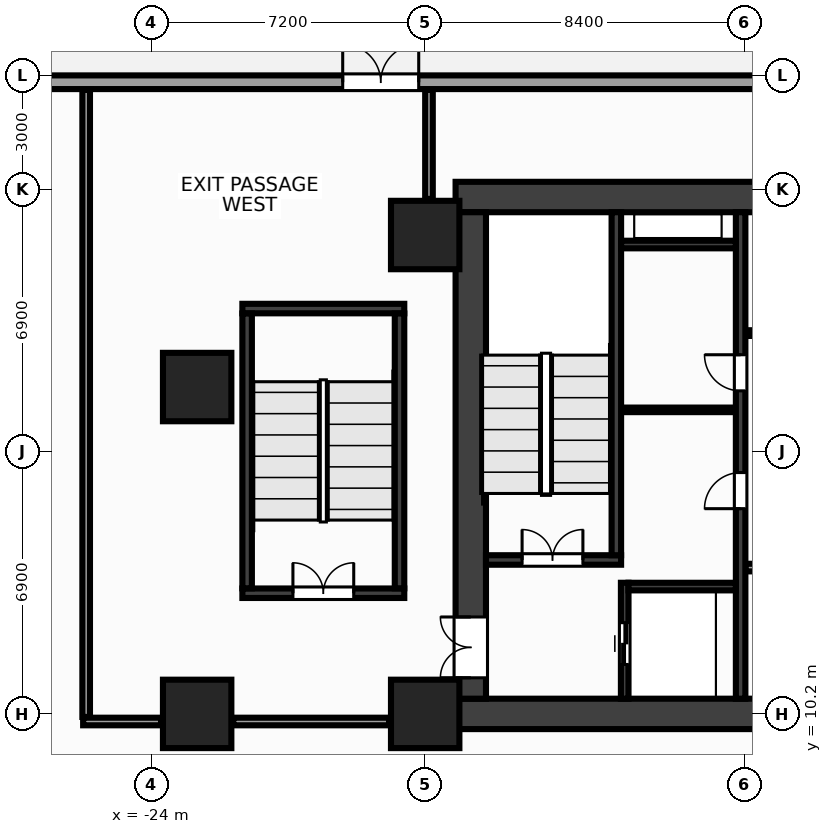
"""IFC4 building model, lengths in metres.
Left out: names, types, materials, properties, quantities, classifications, styles, units other than length and angle.
Written with IfcOpenShell. Run it as: python <this file> out.ifc"""

import sys

from ifc_helpers import new_model, si_unit, direction, frame, frame_2d, origin, origin_2d, place, context, subcontext, project, spatial, rectangle, extrude, source, transform, mapped, element, fill, save


model = new_model("IFC4")
c1 = context("Model", 3, precision=1e-05, world=origin(), true_north=direction((0.0, 1.0)))
c2 = subcontext(c1, "Body", "Model", "MODEL_VIEW")
j1 = project(units=[si_unit("LENGTHUNIT", "METRE"), si_unit("PLANEANGLEUNIT", "RADIAN")], contexts=[c1])
p1 = place(None, origin())
s1 = spatial("IfcSite", under=j1, at=p1, CompositionType="ELEMENT")
p2 = place(p1, origin())
s2 = spatial("IfcBuilding", under=s1, at=p2, CompositionType="ELEMENT")
p3 = place(p2, origin())
s3 = spatial("IfcBuildingStorey", under=s2, at=p3, CompositionType="ELEMENT", Elevation=0.0)
m1 = source(origin(), c2, "Body", "SweptSolid", [
    extrude(rectangle(XDim=32.0, YDim=0.8, at=frame_2d((16.0, 0.0))), origin(), (0.0, 0.0, 1.0), 5.0),
])
p4 = place(p3, frame((-16.0, 23.8, 0.0), z_axis=(0.0, 0.0, 1.0), x_axis=(1.0, 0.0, 0.0)))
e1 = element("IfcWall", 1, at=p4, inside=s3, PredefinedType="SHEAR", context=c2, shape_type="MappedRepresentation", body=[
    mapped(m1, transform((0.0, 0.0, 0.0), x_axis=(1.0, 0.0, 0.0), y_axis=(0.0, 1.0, 0.0), z_axis=(0.0, 0.0, 1.0), scale=1.0)),
])
p5 = place(p3, frame((-16.0, 10.2, 0.0), z_axis=(0.0, 0.0, 1.0), x_axis=(1.0, 0.0, 0.0)))
e2 = element("IfcWall", 2, at=p5, inside=s3, PredefinedType="SHEAR", context=c2, shape_type="MappedRepresentation", body=[
    mapped(m1, transform((0.0, 0.0, 0.0), x_axis=(1.0, 0.0, 0.0), y_axis=(0.0, 1.0, 0.0), z_axis=(0.0, 0.0, 1.0), scale=1.0)),
])
p6 = place(p5, frame((28.55, 0.0, 0.0)))
e3 = element("IfcOpeningElement", 3, at=p6, cuts=e2, PredefinedType="OPENING", context=c2, shape_type="SweptSolid", body=[
    extrude(rectangle(XDim=1.6, YDim=2.15, at=frame_2d((0.8, 1.075))), frame((0.0, 0.412, 0.0), z_axis=(0.0, -1.0, 0.0), x_axis=(1.0, 0.0, 0.0)), (0.0, 0.0, 1.0), 0.824),
])
p7 = place(p5, frame((15.25, 0.0, 0.0)))
e4 = element("IfcOpeningElement", 4, at=p7, cuts=e2, PredefinedType="OPENING", context=c2, shape_type="SweptSolid", body=[
    extrude(rectangle(XDim=1.5, YDim=2.2, at=frame_2d((0.75, 1.1))), frame((0.0, 0.412, 0.0), z_axis=(0.0, -1.0, 0.0), x_axis=(1.0, 0.0, 0.0)), (0.0, 0.0, 1.0), 0.824),
])
m2 = source(origin(), c2, "Body", "SweptSolid", [
    extrude(rectangle(XDim=12.8, YDim=0.8, at=frame_2d((6.4, 0.0))), origin(), (0.0, 0.0, 1.0), 5.0),
])
p8 = place(p3, frame((-15.6, 10.6, 0.0), z_axis=(0.0, 0.0, 1.0), x_axis=(0.0, 1.0, 0.0)))
e5 = element("IfcWall", 5, at=p8, inside=s3, PredefinedType="SHEAR", context=c2, shape_type="MappedRepresentation", body=[
    mapped(m2, transform((0.0, 0.0, 0.0), x_axis=(1.0, 0.0, 0.0), y_axis=(0.0, 1.0, 0.0), z_axis=(0.0, 0.0, 1.0), scale=1.0)),
])
p9 = place(p8, frame((0.55, 0.0, 0.0)))
e6 = element("IfcOpeningElement", 6, at=p9, cuts=e5, PredefinedType="OPENING", context=c2, shape_type="SweptSolid", body=[
    extrude(rectangle(XDim=1.6, YDim=2.15, at=frame_2d((0.8, 1.075))), frame((0.0, 0.412, 0.0), z_axis=(0.0, -1.0, 0.0), x_axis=(1.0, 0.0, 0.0)), (0.0, 0.0, 1.0), 0.824),
])
m3 = source(origin(), c2, "Body", "SweptSolid", [
    extrude(rectangle(XDim=12.8, YDim=0.25, at=frame_2d((6.4, 0.0))), origin(), (0.0, 0.0, 1.0), 5.0),
])
p10 = place(p3, frame((-8.5, 10.6, 0.0), z_axis=(0.0, 0.0, 1.0), x_axis=(0.0, 1.0, 0.0)))
e7 = element("IfcWall", 7, at=p10, inside=s3, PredefinedType="SHEAR", context=c2, shape_type="MappedRepresentation", body=[
    mapped(m3, transform((0.0, 0.0, 0.0), x_axis=(1.0, 0.0, 0.0), y_axis=(0.0, 1.0, 0.0), z_axis=(0.0, 0.0, 1.0), scale=1.0)),
])
p11 = place(p10, frame((5.0, 0.0, 0.0)))
e8 = element("IfcOpeningElement", 8, at=p11, cuts=e7, PredefinedType="OPENING", context=c2, shape_type="SweptSolid", body=[
    extrude(rectangle(XDim=0.95, YDim=2.15, at=frame_2d((0.475, 1.075))), frame((0.0, 0.137, 0.0), z_axis=(0.0, -1.0, 0.0), x_axis=(1.0, 0.0, 0.0)), (0.0, 0.0, 1.0), 0.274),
])
p12 = place(p10, frame((8.1, 0.0, 0.0)))
e9 = element("IfcOpeningElement", 9, at=p12, cuts=e7, PredefinedType="OPENING", context=c2, shape_type="SweptSolid", body=[
    extrude(rectangle(XDim=0.95, YDim=2.15, at=frame_2d((0.475, 1.075))), frame((0.0, 0.137, 0.0), z_axis=(0.0, -1.0, 0.0), x_axis=(1.0, 0.0, 0.0)), (0.0, 0.0, 1.0), 0.274),
])
m4 = source(origin(), c2, "Body", "SweptSolid", [
    extrude(rectangle(XDim=3.555, YDim=0.25, at=frame_2d((1.777, 0.0))), origin(), (0.0, 0.0, 1.0), 5.0),
])
p13 = place(p3, frame((-15.2, 14.25, 0.0), z_axis=(0.0, 0.0, 1.0), x_axis=(1.0, 0.0, 0.0)))
e10 = element("IfcWall", 10, at=p13, inside=s3, PredefinedType="SHEAR", context=c2, shape_type="MappedRepresentation", body=[
    mapped(m4, transform((0.0, 0.0, 0.0), x_axis=(1.0, 0.0, 0.0), y_axis=(0.0, 1.0, 0.0), z_axis=(0.0, 0.0, 1.0), scale=1.0)),
])
p14 = place(p13, frame((0.95, 0.0, 0.0)))
e11 = element("IfcOpeningElement", 11, at=p14, cuts=e10, PredefinedType="OPENING", context=c2, shape_type="SweptSolid", body=[
    extrude(rectangle(XDim=1.6, YDim=2.15, at=frame_2d((0.8, 1.075))), frame((0.0, 0.137, 0.0), z_axis=(0.0, -1.0, 0.0), x_axis=(1.0, 0.0, 0.0)), (0.0, 0.0, 1.0), 0.274),
])
m5 = source(origin(), c2, "Body", "SweptSolid", [
    extrude(rectangle(XDim=9.025, YDim=0.25, at=frame_2d((4.512, 0.0))), origin(), (0.0, 0.0, 1.0), 5.0),
])
p15 = place(p3, frame((-11.77, 14.375, 0.0), z_axis=(0.0, 0.0, 1.0), x_axis=(0.0, 1.0, 0.0)))
e12 = element("IfcWall", 12, at=p15, inside=s3, PredefinedType="SHEAR", context=c2, shape_type="MappedRepresentation", body=[
    mapped(m5, transform((0.0, 0.0, 0.0), x_axis=(1.0, 0.0, 0.0), y_axis=(0.0, 1.0, 0.0), z_axis=(0.0, 0.0, 1.0), scale=1.0)),
])
m6 = source(origin(), c2, "Body", "SweptSolid", [
    extrude(rectangle(XDim=3.05, YDim=0.2, at=frame_2d((1.525, 0.0))), origin(), (0.0, 0.0, 1.0), 5.0),
])
p16 = place(p3, frame((-11.55, 10.6, 0.0), z_axis=(0.0, 0.0, 1.0), x_axis=(0.0, 1.0, 0.0)))
e13 = element("IfcWall", 13, at=p16, inside=s3, PredefinedType="SHEAR", context=c2, shape_type="MappedRepresentation", body=[
    mapped(m6, transform((0.0, 0.0, 0.0), x_axis=(1.0, 0.0, 0.0), y_axis=(0.0, 1.0, 0.0), z_axis=(0.0, 0.0, 1.0), scale=1.0)),
])
p17 = place(p16, frame((0.9, 0.0, 0.0)))
e14 = element("IfcOpeningElement", 14, at=p17, cuts=e13, PredefinedType="OPENING", context=c2, shape_type="SweptSolid", body=[
    extrude(rectangle(XDim=1.1, YDim=2.15, at=frame_2d((0.55, 1.075))), frame((0.0, 0.112, 0.0), z_axis=(0.0, -1.0, 0.0), x_axis=(1.0, 0.0, 0.0)), (0.0, 0.0, 1.0), 0.224),
])
m7 = source(origin(), c2, "Body", "SweptSolid", [
    extrude(rectangle(XDim=2.825, YDim=0.2, at=frame_2d((1.413, 0.0))), origin(), (0.0, 0.0, 1.0), 5.0),
])
p18 = place(p3, frame((-11.45, 13.55, 0.0), z_axis=(0.0, 0.0, 1.0), x_axis=(1.0, 0.0, 0.0)))
e15 = element("IfcWall", 15, at=p18, inside=s3, PredefinedType="SHEAR", context=c2, shape_type="MappedRepresentation", body=[
    mapped(m7, transform((0.0, 0.0, 0.0), x_axis=(1.0, 0.0, 0.0), y_axis=(0.0, 1.0, 0.0), z_axis=(0.0, 0.0, 1.0), scale=1.0)),
])
m8 = source(origin(), c2, "Body", "SweptSolid", [
    extrude(rectangle(XDim=3.02, YDim=0.2, at=frame_2d((1.51, 0.0))), origin(), (0.0, 0.0, 1.0), 5.0),
])
p19 = place(p3, frame((-11.645, 22.55, 0.0), z_axis=(0.0, 0.0, 1.0), x_axis=(1.0, 0.0, 0.0)))
e16 = element("IfcWall", 16, at=p19, inside=s3, PredefinedType="SHEAR", context=c2, shape_type="MappedRepresentation", body=[
    mapped(m8, transform((0.0, 0.0, 0.0), x_axis=(1.0, 0.0, 0.0), y_axis=(0.0, 1.0, 0.0), z_axis=(0.0, 0.0, 1.0), scale=1.0)),
])
m9 = source(origin(), c2, "Body", "SweptSolid", [
    extrude(rectangle(XDim=4.26, YDim=0.25, at=frame_2d((2.13, 0.0))), origin(), (0.0, 0.0, 1.0), 5.0),
])
p20 = place(p3, frame((-21.61, 20.865, 0.0), z_axis=(0.0, 0.0, 1.0), x_axis=(1.0, 0.0, 0.0)))
e17 = element("IfcWall", 17, at=p20, inside=s3, PredefinedType="SHEAR", context=c2, shape_type="MappedRepresentation", body=[
    mapped(m9, transform((0.0, 0.0, 0.0), x_axis=(1.0, 0.0, 0.0), y_axis=(0.0, 1.0, 0.0), z_axis=(0.0, 0.0, 1.0), scale=1.0)),
])
p21 = place(p3, frame((-21.61, 13.375, 0.0), z_axis=(0.0, 0.0, 1.0), x_axis=(1.0, 0.0, 0.0)))
e18 = element("IfcWall", 18, at=p21, inside=s3, PredefinedType="SHEAR", context=c2, shape_type="MappedRepresentation", body=[
    mapped(m9, transform((0.0, 0.0, 0.0), x_axis=(1.0, 0.0, 0.0), y_axis=(0.0, 1.0, 0.0), z_axis=(0.0, 0.0, 1.0), scale=1.0)),
])
p22 = place(p21, frame((1.33, 0.0, 0.0)))
e19 = element("IfcOpeningElement", 19, at=p22, cuts=e18, PredefinedType="OPENING", context=c2, shape_type="SweptSolid", body=[
    extrude(rectangle(XDim=1.6, YDim=2.15, at=frame_2d((0.8, 1.075))), frame((0.0, 0.137, 0.0), z_axis=(0.0, -1.0, 0.0), x_axis=(1.0, 0.0, 0.0)), (0.0, 0.0, 1.0), 0.274),
])
m10 = source(origin(), c2, "Body", "SweptSolid", [
    extrude(rectangle(XDim=7.23, YDim=0.25, at=frame_2d((3.615, 0.0))), origin(), (0.0, 0.0, 1.0), 5.0),
])
for number, where, z_axis, x_axis in (
    (20, (-21.485, 13.505, 0.0), (0.0, 0.0, 1.0), (0.0, 1.0, 0.0)),
    (21, (-17.475, 13.505, 0.0), (0.0, 0.0, 1.0), (0.0, 1.0, 0.0)),
):
    element("IfcWall", number, at=place(p3, frame(where, z_axis=z_axis, x_axis=x_axis)), inside=s3, PredefinedType="SHEAR", context=c2, shape_type="MappedRepresentation", body=[
        mapped(m10, transform((0.0, 0.0, 0.0), x_axis=(1.0, 0.0, 0.0), y_axis=(0.0, 1.0, 0.0), z_axis=(0.0, 0.0, 1.0), scale=1.0)),
    ])
m11 = source(origin(), c2, "Body", "SweptSolid", [
    extrude(rectangle(XDim=1.8, YDim=1.8, at=origin_2d()), origin(), (0.0, 0.0, 1.0), 5.0),
])
for number, where, z_axis, x_axis in (
    (22, (-16.8, 10.2, 0.0), (0.0, 0.0, 1.0), (1.0, 0.0, 0.0)),
    (23, (-16.8, 22.8, 0.0), (0.0, 0.0, 1.0), (1.0, 0.0, 0.0)),
    (24, (-22.8, 10.2, 0.0), (0.0, 0.0, 1.0), (1.0, 0.0, 0.0)),
    (25, (-22.8, 18.8, 0.0), (0.0, 0.0, 1.0), (1.0, 0.0, 0.0)),
):
    element("IfcColumn", number, at=place(p3, frame(where, z_axis=z_axis, x_axis=x_axis)), inside=s3, PredefinedType="COLUMN", context=c2, shape_type="MappedRepresentation", body=[
        mapped(m11, transform((0.0, 0.0, 0.0), x_axis=(1.0, 0.0, 0.0), y_axis=(0.0, 1.0, 0.0), z_axis=(0.0, 0.0, 1.0), scale=1.0)),
    ])
m12 = source(origin(), c2, "Body", "SweptSolid", [
    extrude(rectangle(XDim=85.64, YDim=0.36, at=frame_2d((42.82, 0.0))), origin(), (0.0, 0.0, 1.0), 4.22),
])
p23 = place(p3, frame((-42.82, 26.82, 0.0), z_axis=(0.0, 0.0, 1.0), x_axis=(1.0, 0.0, 0.0)))
e26 = element("IfcWall", 26, at=p23, inside=s3, PredefinedType="STANDARD", context=c2, shape_type="MappedRepresentation", body=[
    mapped(m12, transform((0.0, 0.0, 0.0), x_axis=(1.0, 0.0, 0.0), y_axis=(0.0, 1.0, 0.0), z_axis=(0.0, 0.0, 1.0), scale=1.0)),
])
p24 = place(p23, frame((23.85, 0.0, 0.0)))
e27 = element("IfcOpeningElement", 27, at=p24, cuts=e26, PredefinedType="OPENING", context=c2, shape_type="SweptSolid", body=[
    extrude(rectangle(XDim=2.0, YDim=2.3, at=frame_2d((1.0, 1.15))), frame((0.0, 0.192, 0.0), z_axis=(0.0, -1.0, 0.0), x_axis=(1.0, 0.0, 0.0)), (0.0, 0.0, 1.0), 0.384),
])
p25 = place(p23, frame((59.85, 0.0, 0.0)))
e28 = element("IfcOpeningElement", 28, at=p25, cuts=e26, PredefinedType="OPENING", context=c2, shape_type="SweptSolid", body=[
    extrude(rectangle(XDim=2.0, YDim=2.3, at=frame_2d((1.0, 1.15))), frame((0.0, 0.192, 0.0), z_axis=(0.0, -1.0, 0.0), x_axis=(1.0, 0.0, 0.0)), (0.0, 0.0, 1.0), 0.384),
])
p26 = place(p23, frame((74.4, 0.0, 0.0)))
e29 = element("IfcOpeningElement", 29, at=p26, cuts=e26, PredefinedType="OPENING", context=c2, shape_type="SweptSolid", body=[
    extrude(rectangle(XDim=6.6, YDim=3.2, at=frame_2d((3.3, 1.6))), frame((0.0, 0.192, 0.0), z_axis=(0.0, -1.0, 0.0), x_axis=(1.0, 0.0, 0.0)), (0.0, 0.0, 1.0), 0.384),
])
m13 = source(origin(), c2, "Body", "SweptSolid", [
    extrude(rectangle(XDim=3.01, YDim=0.12, at=frame_2d((1.505, 0.0))), origin(), (0.0, 0.0, 1.0), 4.72),
])
p27 = place(p3, frame((-11.64, 18.2, 0.0), z_axis=(0.0, 0.0, 1.0), x_axis=(1.0, 0.0, 0.0)))
e30 = element("IfcWall", 30, at=p27, inside=s3, PredefinedType="PARTITIONING", context=c2, shape_type="MappedRepresentation", body=[
    mapped(m13, transform((0.0, 0.0, 0.0), x_axis=(1.0, 0.0, 0.0), y_axis=(0.0, 1.0, 0.0), z_axis=(0.0, 0.0, 1.0), scale=1.0)),
])
m14 = source(origin(), c2, "Body", "SweptSolid", [
    extrude(rectangle(XDim=7.07, YDim=0.2, at=frame_2d((3.535, 0.0))), origin(), (0.0, 0.0, 1.0), 4.72),
])
p28 = place(p3, frame((-8.37, 14.05, 0.0), z_axis=(0.0, 0.0, 1.0), x_axis=(1.0, 0.0, 0.0)))
e31 = element("IfcWall", 31, at=p28, inside=s3, PredefinedType="PARTITIONING", context=c2, shape_type="MappedRepresentation", body=[
    mapped(m14, transform((0.0, 0.0, 0.0), x_axis=(1.0, 0.0, 0.0), y_axis=(0.0, 1.0, 0.0), z_axis=(0.0, 0.0, 1.0), scale=1.0)),
])
p29 = place(p28, frame((0.6, 0.0, 0.0)))
e32 = element("IfcOpeningElement", 32, at=p29, cuts=e31, PredefinedType="OPENING", context=c2, shape_type="SweptSolid", body=[
    extrude(rectangle(XDim=1.1, YDim=2.15, at=frame_2d((0.55, 1.075))), frame((0.0, 0.112, 0.0), z_axis=(0.0, -1.0, 0.0), x_axis=(1.0, 0.0, 0.0)), (0.0, 0.0, 1.0), 0.224),
])
p30 = place(p28, frame((2.95, 0.0, 0.0)))
e33 = element("IfcOpeningElement", 33, at=p30, cuts=e31, PredefinedType="OPENING", context=c2, shape_type="SweptSolid", body=[
    extrude(rectangle(XDim=1.1, YDim=2.15, at=frame_2d((0.55, 1.075))), frame((0.0, 0.112, 0.0), z_axis=(0.0, -1.0, 0.0), x_axis=(1.0, 0.0, 0.0)), (0.0, 0.0, 1.0), 0.224),
])
p31 = place(p28, frame((5.3, 0.0, 0.0)))
e34 = element("IfcOpeningElement", 34, at=p31, cuts=e31, PredefinedType="OPENING", context=c2, shape_type="SweptSolid", body=[
    extrude(rectangle(XDim=1.1, YDim=2.15, at=frame_2d((0.55, 1.075))), frame((0.0, 0.112, 0.0), z_axis=(0.0, -1.0, 0.0), x_axis=(1.0, 0.0, 0.0)), (0.0, 0.0, 1.0), 0.224),
])
m15 = source(origin(), c2, "Body", "SweptSolid", [
    extrude(rectangle(XDim=14.59, YDim=0.15, at=frame_2d((7.295, 0.0))), origin(), (0.0, 0.0, 1.0), 4.72),
])
p32 = place(p3, frame((-8.37, 20.22, 0.0), z_axis=(0.0, 0.0, 1.0), x_axis=(1.0, 0.0, 0.0)))
e35 = element("IfcWall", 35, at=p32, inside=s3, PredefinedType="PARTITIONING", context=c2, shape_type="MappedRepresentation", body=[
    mapped(m15, transform((0.0, 0.0, 0.0), x_axis=(1.0, 0.0, 0.0), y_axis=(0.0, 1.0, 0.0), z_axis=(0.0, 0.0, 1.0), scale=1.0)),
])
p33 = place(p32, frame((0.86, 0.0, 0.0)))
e36 = element("IfcOpeningElement", 36, at=p33, cuts=e35, PredefinedType="OPENING", context=c2, shape_type="SweptSolid", body=[
    extrude(rectangle(XDim=0.9, YDim=2.15, at=frame_2d((0.45, 1.075))), frame((0.0, 0.087, 0.0), z_axis=(0.0, -1.0, 0.0), x_axis=(1.0, 0.0, 0.0)), (0.0, 0.0, 1.0), 0.174),
])
p34 = place(p32, frame((3.47, 0.0, 0.0)))
e37 = element("IfcOpeningElement", 37, at=p34, cuts=e35, PredefinedType="OPENING", context=c2, shape_type="SweptSolid", body=[
    extrude(rectangle(XDim=0.9, YDim=2.15, at=frame_2d((0.45, 1.075))), frame((0.0, 0.087, 0.0), z_axis=(0.0, -1.0, 0.0), x_axis=(1.0, 0.0, 0.0)), (0.0, 0.0, 1.0), 0.174),
])
p35 = place(p32, frame((6.17, 0.0, 0.0)))
e38 = element("IfcOpeningElement", 38, at=p35, cuts=e35, PredefinedType="OPENING", context=c2, shape_type="SweptSolid", body=[
    extrude(rectangle(XDim=0.9, YDim=2.15, at=frame_2d((0.45, 1.075))), frame((0.0, 0.087, 0.0), z_axis=(0.0, -1.0, 0.0), x_axis=(1.0, 0.0, 0.0)), (0.0, 0.0, 1.0), 0.174),
])
p36 = place(p32, frame((9.07, 0.0, 0.0)))
e39 = element("IfcOpeningElement", 39, at=p36, cuts=e35, PredefinedType="OPENING", context=c2, shape_type="SweptSolid", body=[
    extrude(rectangle(XDim=0.9, YDim=2.15, at=frame_2d((0.45, 1.075))), frame((0.0, 0.087, 0.0), z_axis=(0.0, -1.0, 0.0), x_axis=(1.0, 0.0, 0.0)), (0.0, 0.0, 1.0), 0.174),
])
p37 = place(p32, frame((12.32, 0.0, 0.0)))
e40 = element("IfcOpeningElement", 40, at=p37, cuts=e35, PredefinedType="OPENING", context=c2, shape_type="SweptSolid", body=[
    extrude(rectangle(XDim=0.9, YDim=2.15, at=frame_2d((0.45, 1.075))), frame((0.0, 0.087, 0.0), z_axis=(0.0, -1.0, 0.0), x_axis=(1.0, 0.0, 0.0)), (0.0, 0.0, 1.0), 0.174),
])
m16 = source(origin(), c2, "Body", "SweptSolid", [
    extrude(rectangle(XDim=16.5, YDim=0.2, at=frame_2d((8.25, 0.0))), origin(), (0.0, 0.0, 1.0), 4.72),
])
p38 = place(p3, frame((-25.72, 10.12, 0.0), z_axis=(0.0, 0.0, 1.0), x_axis=(0.0, 1.0, 0.0)))
e41 = element("IfcWall", 41, at=p38, inside=s3, PredefinedType="PARTITIONING", context=c2, shape_type="MappedRepresentation", body=[
    mapped(m16, transform((0.0, 0.0, 0.0), x_axis=(1.0, 0.0, 0.0), y_axis=(0.0, 1.0, 0.0), z_axis=(0.0, 0.0, 1.0), scale=1.0)),
])
m17 = source(origin(), c2, "Body", "SweptSolid", [
    extrude(rectangle(XDim=2.05, YDim=0.2, at=frame_2d((1.025, 0.0))), origin(), (0.0, 0.0, 1.0), 4.72),
])
p39 = place(p3, frame((-25.8, 10.0, 0.0), z_axis=(0.0, 0.0, 1.0), x_axis=(1.0, 0.0, 0.0)))
e42 = element("IfcWall", 42, at=p39, inside=s3, PredefinedType="PARTITIONING", context=c2, shape_type="MappedRepresentation", body=[
    mapped(m17, transform((0.0, 0.0, 0.0), x_axis=(1.0, 0.0, 0.0), y_axis=(0.0, 1.0, 0.0), z_axis=(0.0, 0.0, 1.0), scale=1.0)),
])
m18 = source(origin(), c2, "Body", "SweptSolid", [
    extrude(rectangle(XDim=4.1, YDim=0.2, at=frame_2d((2.05, 0.0))), origin(), (0.0, 0.0, 1.0), 4.105),
])
p40 = place(p3, frame((-21.85, 10.0, 0.0), z_axis=(0.0, 0.0, 1.0), x_axis=(1.0, 0.0, 0.0)))
e43 = element("IfcWall", 43, at=p40, inside=s3, PredefinedType="PARTITIONING", context=c2, shape_type="MappedRepresentation", body=[
    mapped(m18, transform((0.0, 0.0, 0.0), x_axis=(1.0, 0.0, 0.0), y_axis=(0.0, 1.0, 0.0), z_axis=(0.0, 0.0, 1.0), scale=1.0)),
])
m19 = source(origin(), c2, "Body", "SweptSolid", [
    extrude(rectangle(XDim=2.87, YDim=0.2, at=frame_2d((1.435, 0.0))), origin(), (0.0, 0.0, 1.0), 4.72),
])
p41 = place(p3, frame((-16.7, 23.75, 0.0), z_axis=(0.0, 0.0, 1.0), x_axis=(0.0, 1.0, 0.0)))
e44 = element("IfcWall", 44, at=p41, inside=s3, PredefinedType="PARTITIONING", context=c2, shape_type="MappedRepresentation", body=[
    mapped(m19, transform((0.0, 0.0, 0.0), x_axis=(1.0, 0.0, 0.0), y_axis=(0.0, 1.0, 0.0), z_axis=(0.0, 0.0, 1.0), scale=1.0)),
])
m20 = source(origin(), c2, "Body", "SweptSolid", [
    extrude(rectangle(XDim=2.0, YDim=2.3, at=frame_2d((1.0, 1.15))), frame((0.0, 0.025, 0.0), z_axis=(0.0, -1.0, 0.0), x_axis=(1.0, 0.0, 0.0)), (0.0, 0.0, 1.0), 0.05),
])
p42 = place(p24, origin())
e45 = element("IfcDoor", 45, at=p42, inside=s3, OperationType="DOUBLE_DOOR_SINGLE_SWING", PredefinedType="DOOR", context=c2, shape_type="MappedRepresentation", body=[
    mapped(m20, transform((0.0, 0.0, 0.0), x_axis=(1.0, 0.0, 0.0), y_axis=(0.0, 1.0, 0.0), z_axis=(0.0, 0.0, 1.0), scale=1.0)),
])
fill(e27, e45)
m21 = source(origin(), c2, "Body", "SweptSolid", [
    extrude(rectangle(XDim=1.6, YDim=2.15, at=frame_2d((0.8, 1.075))), frame((0.0, 0.025, 0.0), z_axis=(0.0, -1.0, 0.0), x_axis=(1.0, 0.0, 0.0)), (0.0, 0.0, 1.0), 0.05),
])
p43 = place(p14, origin())
e46 = element("IfcDoor", 46, at=p43, inside=s3, OperationType="DOUBLE_DOOR_SINGLE_SWING", PredefinedType="DOOR", context=c2, shape_type="MappedRepresentation", body=[
    mapped(m21, transform((0.0, 0.0, 0.0), x_axis=(1.0, 0.0, 0.0), y_axis=(0.0, 1.0, 0.0), z_axis=(0.0, 0.0, 1.0), scale=1.0)),
])
fill(e11, e46)
p44 = place(p9, origin())
e47 = element("IfcDoor", 47, at=p44, inside=s3, OperationType="DOUBLE_DOOR_SINGLE_SWING", PredefinedType="DOOR", context=c2, shape_type="MappedRepresentation", body=[
    mapped(m21, transform((0.0, 0.0, 0.0), x_axis=(1.0, 0.0, 0.0), y_axis=(0.0, 1.0, 0.0), z_axis=(0.0, 0.0, 1.0), scale=1.0)),
])
fill(e6, e47)
m22 = source(origin(), c2, "Body", "SweptSolid", [
    extrude(rectangle(XDim=1.1, YDim=2.15, at=frame_2d((0.55, 1.075))), frame((0.0, 0.025, 0.0), z_axis=(0.0, -1.0, 0.0), x_axis=(1.0, 0.0, 0.0)), (0.0, 0.0, 1.0), 0.05),
])
p45 = place(p17, origin())
e48 = element("IfcDoor", 48, at=p45, inside=s3, OperationType="DOUBLE_DOOR_SLIDING", PredefinedType="DOOR", context=c2, shape_type="MappedRepresentation", body=[
    mapped(m22, transform((0.0, 0.0, 0.0), x_axis=(1.0, 0.0, 0.0), y_axis=(0.0, 1.0, 0.0), z_axis=(0.0, 0.0, 1.0), scale=1.0)),
])
fill(e14, e48)
p46 = place(p22, origin())
e49 = element("IfcDoor", 49, at=p46, inside=s3, OperationType="DOUBLE_DOOR_SINGLE_SWING", PredefinedType="DOOR", context=c2, shape_type="MappedRepresentation", body=[
    mapped(m21, transform((0.0, 0.0, 0.0), x_axis=(1.0, 0.0, 0.0), y_axis=(0.0, 1.0, 0.0), z_axis=(0.0, 0.0, 1.0), scale=1.0)),
])
fill(e19, e49)
m23 = source(origin(), c2, "Body", "SweptSolid", [
    extrude(rectangle(XDim=0.95, YDim=2.15, at=frame_2d((0.475, 1.075))), frame((0.0, 0.025, 0.0), z_axis=(0.0, -1.0, 0.0), x_axis=(1.0, 0.0, 0.0)), (0.0, 0.0, 1.0), 0.05),
])
p47 = place(p11, origin())
e50 = element("IfcDoor", 50, at=p47, inside=s3, OperationType="SINGLE_SWING_LEFT", PredefinedType="DOOR", context=c2, shape_type="MappedRepresentation", body=[
    mapped(m23, transform((0.0, 0.0, 0.0), x_axis=(1.0, 0.0, 0.0), y_axis=(0.0, 1.0, 0.0), z_axis=(0.0, 0.0, 1.0), scale=1.0)),
])
fill(e8, e50)
p48 = place(p12, origin())
e51 = element("IfcDoor", 51, at=p48, inside=s3, OperationType="SINGLE_SWING_RIGHT", PredefinedType="DOOR", context=c2, shape_type="MappedRepresentation", body=[
    mapped(m23, transform((0.0, 0.0, 0.0), x_axis=(1.0, 0.0, 0.0), y_axis=(0.0, 1.0, 0.0), z_axis=(0.0, 0.0, 1.0), scale=1.0)),
])
fill(e9, e51)
save(model, sys.argv[1])
